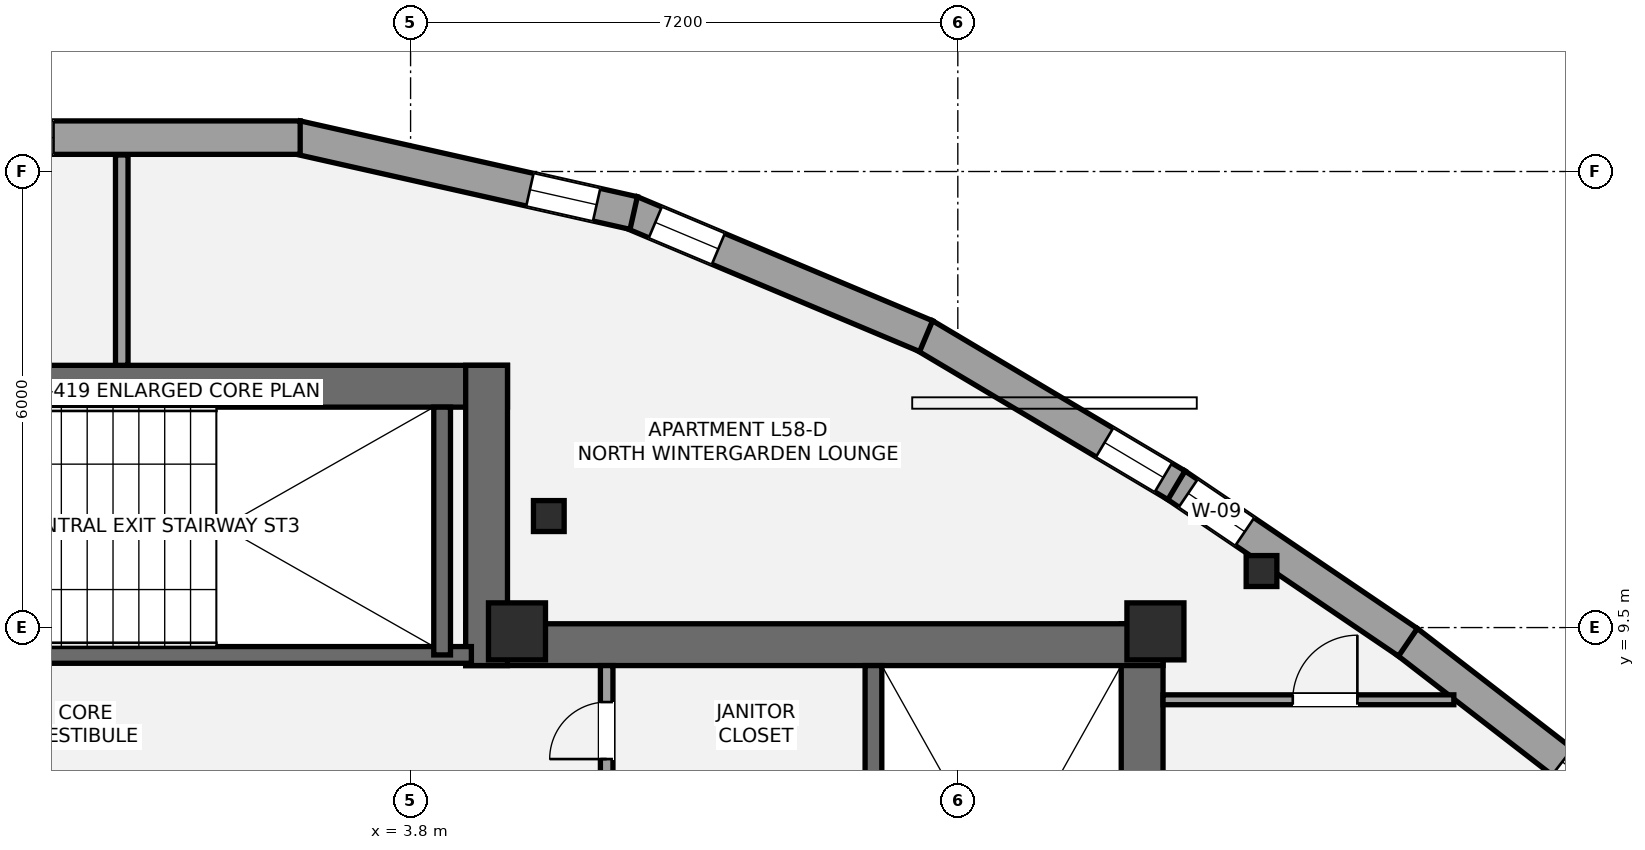
"""IFC4 building model, lengths in metres.
Left out: names, types, materials, properties, quantities, classifications, styles, units other than length and angle.
Written with IfcOpenShell. Run it as: python <this file> out.ifc"""

import sys

from ifc_helpers import new_model, si_unit, direction, frame, frame_2d, origin, origin_2d, place, context, subcontext, project, spatial, rectangle, i_section, extrude, element, fill, save


model = new_model("IFC4")
c1 = context("Model", 3, precision=1e-05, world=origin(), true_north=direction((0.0, 1.0)))
c2 = subcontext(c1, "Body", "Model", "MODEL_VIEW")
j1 = project(units=[si_unit("LENGTHUNIT", "METRE"), si_unit("PLANEANGLEUNIT", "RADIAN")], contexts=[c1])
p1 = place(None, origin())
s1 = spatial("IfcSite", under=j1, at=p1, CompositionType="ELEMENT")
p2 = place(p1, origin())
s2 = spatial("IfcBuilding", under=s1, at=p2, CompositionType="ELEMENT")
p3 = place(p2, frame((0.0, 0.0, 210.0)))
s3 = spatial("IfcBuildingStorey", under=s2, at=p3, CompositionType="ELEMENT", Elevation=210.0)
p4 = place(p3, frame((13.425, 1.3, 0.0), z_axis=(0.0, 0.0, 1.0), x_axis=(0.0, 1.0, 0.0)))
e1 = element("IfcWall", 1, at=p4, inside=s3, PredefinedType="SHEAR", context=c2, shape_type="SweptSolid", body=[
    extrude(rectangle(XDim=8.25, YDim=0.55, at=frame_2d((4.125, 0.0))), origin(), (0.0, 0.0, 1.0), 3.15),
])
p5 = place(p3, frame((4.525, 9.275, 0.0), z_axis=(0.0, 0.0, 1.0), x_axis=(1.0, 0.0, 0.0)))
e2 = element("IfcWall", 2, at=p5, inside=s3, PredefinedType="SHEAR", context=c2, shape_type="SweptSolid", body=[
    extrude(rectangle(XDim=9.175, YDim=0.55, at=frame_2d((4.587, 0.0))), origin(), (0.0, 0.0, 1.0), 3.15),
])
p6 = place(p3, frame((9.89, 1.85, 0.0), z_axis=(0.0, 0.0, 1.0), x_axis=(0.0, 1.0, 0.0)))
e3 = element("IfcWall", 3, at=p6, inside=s3, PredefinedType="SHEAR", context=c2, shape_type="SweptSolid", body=[
    extrude(rectangle(XDim=7.15, YDim=0.22, at=frame_2d((3.575, 0.0))), origin(), (0.0, 0.0, 1.0), 3.15),
])
p7 = place(p3, frame((-5.075, 12.675, 0.0), z_axis=(0.0, 0.0, 1.0), x_axis=(1.0, 0.0, 0.0)))
e4 = element("IfcWall", 4, at=p7, inside=s3, PredefinedType="SHEAR", context=c2, shape_type="SweptSolid", body=[
    extrude(rectangle(XDim=10.15, YDim=0.55, at=frame_2d((5.075, 0.0))), origin(), (0.0, 0.0, 1.0), 3.15),
])
p8 = place(p3, frame((4.8, 9.0, 0.0), z_axis=(0.0, 0.0, 1.0), x_axis=(0.0, 1.0, 0.0)))
e5 = element("IfcWall", 5, at=p8, inside=s3, PredefinedType="SHEAR", context=c2, shape_type="SweptSolid", body=[
    extrude(rectangle(XDim=3.95, YDim=0.55, at=frame_2d((1.975, 0.0))), origin(), (0.0, 0.0, 1.0), 3.15),
])
p9 = place(p3, frame((-4.7, 9.14, 0.0), z_axis=(0.0, 0.0, 1.0), x_axis=(1.0, 0.0, 0.0)))
e6 = element("IfcWall", 6, at=p9, inside=s3, PredefinedType="SHEAR", context=c2, shape_type="SweptSolid", body=[
    extrude(rectangle(XDim=9.3, YDim=0.22, at=frame_2d((4.65, 0.0))), origin(), (0.0, 0.0, 1.0), 3.15),
])
p10 = place(p9, frame((1.15, 0.0, 0.0)))
e7 = element("IfcOpeningElement", 7, at=p10, cuts=e6, PredefinedType="OPENING", context=c2, shape_type="SweptSolid", body=[
    extrude(rectangle(XDim=1.05, YDim=2.15, at=frame_2d((0.525, 1.075))), frame((0.0, 0.12, 0.0), z_axis=(0.0, -1.0, 0.0), x_axis=(1.0, 0.0, 0.0)), (0.0, 0.0, 1.0), 0.24),
])
p11 = place(p3, frame((4.215, 9.14, 0.0), z_axis=(0.0, 0.0, 1.0), x_axis=(0.0, 1.0, 0.0)))
e8 = element("IfcWall", 8, at=p11, inside=s3, PredefinedType="SHEAR", context=c2, shape_type="SweptSolid", body=[
    extrude(rectangle(XDim=3.26, YDim=0.22, at=frame_2d((1.63, 0.0))), origin(), (0.0, 0.0, 1.0), 3.15),
])
for number, where, z_axis, x_axis in (
    (9, (5.2, 9.45, 0.0), (0.0, 0.0, 1.0), (1.0, 0.0, 0.0)),
    (10, (13.6, 9.45, 0.0), (0.0, 0.0, 1.0), (1.0, 0.0, 0.0)),
):
    element("IfcColumn", number, at=place(p3, frame(where, z_axis=z_axis, x_axis=x_axis)), inside=s3, PredefinedType="PILASTER", context=c2, shape_type="SweptSolid", body=[
        extrude(rectangle(XDim=0.75, YDim=0.75, at=origin_2d()), origin(), (0.0, 0.0, 1.0), 3.15),
    ])
for number, where, z_axis, x_axis in (
    (11, (14.996, 10.244, 0.0), (0.0, 0.0, 1.0), (1.0, 0.0, 0.0)),
    (12, (5.619, 10.967, 0.0), (0.0, 0.0, 1.0), (1.0, 0.0, 0.0)),
):
    element("IfcColumn", number, at=place(p3, frame(where, z_axis=z_axis, x_axis=x_axis)), inside=s3, PredefinedType="COLUMN", context=c2, shape_type="SweptSolid", body=[
        extrude(i_section(OverallWidth=0.404, OverallDepth=0.407, WebThickness=0.027, FlangeThickness=0.044, at=origin_2d()), origin(), (0.0, 0.0, 1.0), 3.15),
    ])
p12 = place(p3, frame((16.911, 9.314, 0.0), z_axis=(0.0, 0.0, 1.0), x_axis=(0.791016617957, -0.61179466336, 0.0)))
e13 = element("IfcWall", 13, at=p12, inside=s3, PredefinedType="STANDARD", context=c2, shape_type="SweptSolid", body=[
    extrude(rectangle(XDim=3.682, YDim=0.44, at=frame_2d((1.841, 0.0))), origin(), (0.0, 0.0, 1.0), 2.336),
])
p13 = place(p12, frame((2.582, 0.0, 0.42)))
e14 = element("IfcOpeningElement", 14, at=p13, cuts=e13, PredefinedType="OPENING", context=c2, shape_type="SweptSolid", body=[
    extrude(rectangle(XDim=0.9, YDim=1.35, at=frame_2d((0.45, 0.675))), frame((0.0, 0.23, 0.0), z_axis=(0.0, -1.0, 0.0), x_axis=(1.0, 0.0, 0.0)), (0.0, 0.0, 1.0), 0.46),
])
p14 = place(p3, frame((13.865, 11.379, 0.0), z_axis=(0.0, 0.0, 1.0), x_axis=(0.827589832786, -0.561333295529, 0.0)))
e15 = element("IfcWall", 15, at=p14, inside=s3, PredefinedType="STANDARD", context=c2, shape_type="SweptSolid", body=[
    extrude(rectangle(XDim=3.693, YDim=0.44, at=frame_2d((1.847, 0.0))), origin(), (0.0, 0.0, 1.0), 2.336),
])
p15 = place(p14, frame((0.2, 0.0, 0.42)))
e16 = element("IfcOpeningElement", 16, at=p15, cuts=e15, PredefinedType="OPENING", context=c2, shape_type="SweptSolid", body=[
    extrude(rectangle(XDim=0.9, YDim=1.35, at=frame_2d((0.45, 0.675))), frame((0.0, 0.23, 0.0), z_axis=(0.0, -1.0, 0.0), x_axis=(1.0, 0.0, 0.0)), (0.0, 0.0, 1.0), 0.46),
])
p16 = place(p3, frame((10.555, 13.348, 0.0), z_axis=(0.0, 0.0, 1.0), x_axis=(0.859415840392, -0.511277237204, 0.0)))
e17 = element("IfcWall", 17, at=p16, inside=s3, PredefinedType="STANDARD", context=c2, shape_type="SweptSolid", body=[
    extrude(rectangle(XDim=3.864, YDim=0.44, at=frame_2d((1.932, 0.0))), origin(), (0.0, 0.0, 1.0), 2.336),
])
p17 = place(p16, frame((2.764, 0.0, 0.58)))
e18 = element("IfcOpeningElement", 18, at=p17, cuts=e17, PredefinedType="OPENING", context=c2, shape_type="SweptSolid", body=[
    extrude(rectangle(XDim=0.9, YDim=1.35, at=frame_2d((0.45, 0.675))), frame((0.0, 0.23, 0.0), z_axis=(0.0, -1.0, 0.0), x_axis=(1.0, 0.0, 0.0)), (0.0, 0.0, 1.0), 0.46),
])
p18 = place(p3, frame((6.699, 14.966, 0.0), z_axis=(0.0, 0.0, 1.0), x_axis=(0.921948168537, -0.387313276988, 0.0)))
e19 = element("IfcWall", 19, at=p18, inside=s3, PredefinedType="STANDARD", context=c2, shape_type="SweptSolid", body=[
    extrude(rectangle(XDim=4.213, YDim=0.44, at=frame_2d((2.106, 0.0))), origin(), (0.0, 0.0, 1.0), 2.336),
])
p19 = place(p18, frame((0.348, 0.0, 0.58)))
e20 = element("IfcOpeningElement", 20, at=p19, cuts=e19, PredefinedType="OPENING", context=c2, shape_type="SweptSolid", body=[
    extrude(rectangle(XDim=0.9, YDim=1.35, at=frame_2d((0.45, 0.675))), frame((0.0, 0.23, 0.0), z_axis=(0.0, -1.0, 0.0), x_axis=(1.0, 0.0, 0.0)), (0.0, 0.0, 1.0), 0.46),
])
p20 = place(p3, frame((2.299, 15.951, 0.0), z_axis=(0.0, 0.0, 1.0), x_axis=(0.97564079092, -0.219374217021, 0.0)))
e21 = element("IfcWall", 21, at=p20, inside=s3, PredefinedType="STANDARD", context=c2, shape_type="SweptSolid", body=[
    extrude(rectangle(XDim=4.547, YDim=0.44, at=frame_2d((2.274, 0.0))), origin(), (0.0, 0.0, 1.0), 2.336),
])
p21 = place(p20, frame((3.147, 0.0, 0.58)))
e22 = element("IfcOpeningElement", 22, at=p21, cuts=e21, PredefinedType="OPENING", context=c2, shape_type="SweptSolid", body=[
    extrude(rectangle(XDim=0.9, YDim=1.35, at=frame_2d((0.45, 0.675))), frame((0.0, 0.23, 0.0), z_axis=(0.0, -1.0, 0.0), x_axis=(1.0, 0.0, 0.0)), (0.0, 0.0, 1.0), 0.46),
])
p22 = place(p3, frame((-2.347, 15.946, 0.0), z_axis=(0.0, 0.0, 1.0), x_axis=(1.0, 0.0, 0.0)))
e23 = element("IfcWall", 23, at=p22, inside=s3, PredefinedType="STANDARD", context=c2, shape_type="SweptSolid", body=[
    extrude(rectangle(XDim=4.695, YDim=0.44, at=frame_2d((2.347, 0.0))), origin(), (0.0, 0.0, 1.0), 2.336),
])
p23 = place(p22, frame((0.55, 0.0, 0.58)))
e24 = element("IfcOpeningElement", 24, at=p23, cuts=e23, PredefinedType="OPENING", context=c2, shape_type="SweptSolid", body=[
    extrude(rectangle(XDim=0.9, YDim=1.35, at=frame_2d((0.45, 0.675))), frame((0.0, 0.23, 0.0), z_axis=(0.0, -1.0, 0.0), x_axis=(1.0, 0.0, 0.0)), (0.0, 0.0, 1.0), 0.46),
])
p24 = place(p3, frame((6.38, 7.42, 0.0), z_axis=(0.0, 0.0, 1.0), x_axis=(0.0, 1.0, 0.0)))
e25 = element("IfcWall", 25, at=p24, inside=s3, PredefinedType="PARTITIONING", context=c2, shape_type="SweptSolid", body=[
    extrude(rectangle(XDim=1.58, YDim=0.165, at=frame_2d((0.79, 0.0))), origin(), (0.0, 0.0, 1.0), 2.97),
])
p25 = place(p24, frame((0.35, 0.0, 0.0)))
e26 = element("IfcOpeningElement", 26, at=p25, cuts=e25, PredefinedType="OPENING", context=c2, shape_type="SweptSolid", body=[
    extrude(rectangle(XDim=0.75, YDim=2.1, at=frame_2d((0.375, 1.05))), frame((0.0, 0.093, 0.0), z_axis=(0.0, -1.0, 0.0), x_axis=(1.0, 0.0, 0.0)), (0.0, 0.0, 1.0), 0.185),
])
p26 = place(p3, frame((0.0, 12.95, 0.0), z_axis=(0.0, 0.0, 1.0), x_axis=(0.0, 1.0, 0.0)))
e27 = element("IfcWall", 27, at=p26, inside=s3, PredefinedType="PARTITIONING", context=c2, shape_type="SweptSolid", body=[
    extrude(rectangle(XDim=2.768, YDim=0.165, at=frame_2d((1.384, 0.0))), origin(), (0.0, 0.0, 1.0), 2.97),
])
p27 = place(p3, frame((13.7, 8.55, 0.0), z_axis=(0.0, 0.0, 1.0), x_axis=(1.0, 0.0, 0.0)))
e28 = element("IfcWall", 28, at=p27, inside=s3, PredefinedType="PARTITIONING", context=c2, shape_type="SweptSolid", body=[
    extrude(rectangle(XDim=3.826, YDim=0.13, at=frame_2d((1.913, 0.0))), origin(), (0.0, 0.0, 1.0), 2.423),
])
p28 = place(p27, frame((1.707, 0.0, 0.0)))
e29 = element("IfcOpeningElement", 29, at=p28, cuts=e28, PredefinedType="OPENING", context=c2, shape_type="SweptSolid", body=[
    extrude(rectangle(XDim=0.85, YDim=2.1, at=frame_2d((0.425, 1.05))), frame((0.0, 0.075, 0.0), z_axis=(0.0, -1.0, 0.0), x_axis=(1.0, 0.0, 0.0)), (0.0, 0.0, 1.0), 0.15),
])
p29 = place(p13, origin())
e30 = element("IfcWindow", 30, at=p29, inside=s3, PartitioningType="SINGLE_PANEL", PredefinedType="WINDOW", context=c2, shape_type="SweptSolid", body=[
    extrude(rectangle(XDim=0.9, YDim=1.35, at=frame_2d((0.45, 0.675))), frame((0.0, -0.01, 0.0), z_axis=(0.0, -1.0, 0.0), x_axis=(1.0, 0.0, 0.0)), (0.0, 0.0, 1.0), 0.06),
])
fill(e14, e30)
p30 = place(p15, origin())
e31 = element("IfcWindow", 31, at=p30, inside=s3, PartitioningType="SINGLE_PANEL", PredefinedType="WINDOW", context=c2, shape_type="SweptSolid", body=[
    extrude(rectangle(XDim=0.9, YDim=1.35, at=frame_2d((0.45, 0.675))), frame((0.0, -0.01, 0.0), z_axis=(0.0, -1.0, 0.0), x_axis=(1.0, 0.0, 0.0)), (0.0, 0.0, 1.0), 0.06),
])
fill(e16, e31)
p31 = place(p17, origin())
e32 = element("IfcWindow", 32, at=p31, inside=s3, PartitioningType="SINGLE_PANEL", PredefinedType="WINDOW", context=c2, shape_type="SweptSolid", body=[
    extrude(rectangle(XDim=0.9, YDim=1.35, at=frame_2d((0.45, 0.675))), frame((0.0, -0.01, 0.0), z_axis=(0.0, -1.0, 0.0), x_axis=(1.0, 0.0, 0.0)), (0.0, 0.0, 1.0), 0.06),
])
fill(e18, e32)
p32 = place(p19, origin())
e33 = element("IfcWindow", 33, at=p32, inside=s3, PartitioningType="SINGLE_PANEL", PredefinedType="WINDOW", context=c2, shape_type="SweptSolid", body=[
    extrude(rectangle(XDim=0.9, YDim=1.35, at=frame_2d((0.45, 0.675))), frame((0.0, -0.01, 0.0), z_axis=(0.0, -1.0, 0.0), x_axis=(1.0, 0.0, 0.0)), (0.0, 0.0, 1.0), 0.06),
])
fill(e20, e33)
p33 = place(p21, origin())
e34 = element("IfcWindow", 34, at=p33, inside=s3, PartitioningType="SINGLE_PANEL", PredefinedType="WINDOW", context=c2, shape_type="SweptSolid", body=[
    extrude(rectangle(XDim=0.9, YDim=1.35, at=frame_2d((0.45, 0.675))), frame((0.0, -0.01, 0.0), z_axis=(0.0, -1.0, 0.0), x_axis=(1.0, 0.0, 0.0)), (0.0, 0.0, 1.0), 0.06),
])
fill(e22, e34)
p34 = place(p23, origin())
e35 = element("IfcWindow", 35, at=p34, inside=s3, PartitioningType="SINGLE_PANEL", PredefinedType="WINDOW", context=c2, shape_type="SweptSolid", body=[
    extrude(rectangle(XDim=0.9, YDim=1.35, at=frame_2d((0.45, 0.675))), frame((0.0, -0.01, 0.0), z_axis=(0.0, -1.0, 0.0), x_axis=(1.0, 0.0, 0.0)), (0.0, 0.0, 1.0), 0.06),
])
fill(e24, e35)
p35 = place(p25, origin())
e36 = element("IfcDoor", 36, at=p35, inside=s3, OperationType="SINGLE_SWING_LEFT", PredefinedType="DOOR", context=c2, shape_type="SweptSolid", body=[
    extrude(rectangle(XDim=0.75, YDim=2.1, at=frame_2d((0.375, 1.05))), frame((0.0, 0.025, 0.0), z_axis=(0.0, -1.0, 0.0), x_axis=(1.0, 0.0, 0.0)), (0.0, 0.0, 1.0), 0.05),
])
fill(e26, e36)
p36 = place(p28, origin())
e37 = element("IfcDoor", 37, at=p36, inside=s3, OperationType="SINGLE_SWING_RIGHT", PredefinedType="DOOR", context=c2, shape_type="SweptSolid", body=[
    extrude(rectangle(XDim=0.85, YDim=2.1, at=frame_2d((0.425, 1.05))), frame((0.0, 0.025, 0.0), z_axis=(0.0, -1.0, 0.0), x_axis=(1.0, 0.0, 0.0)), (0.0, 0.0, 1.0), 0.05),
])
fill(e29, e37)
save(model, sys.argv[1])
